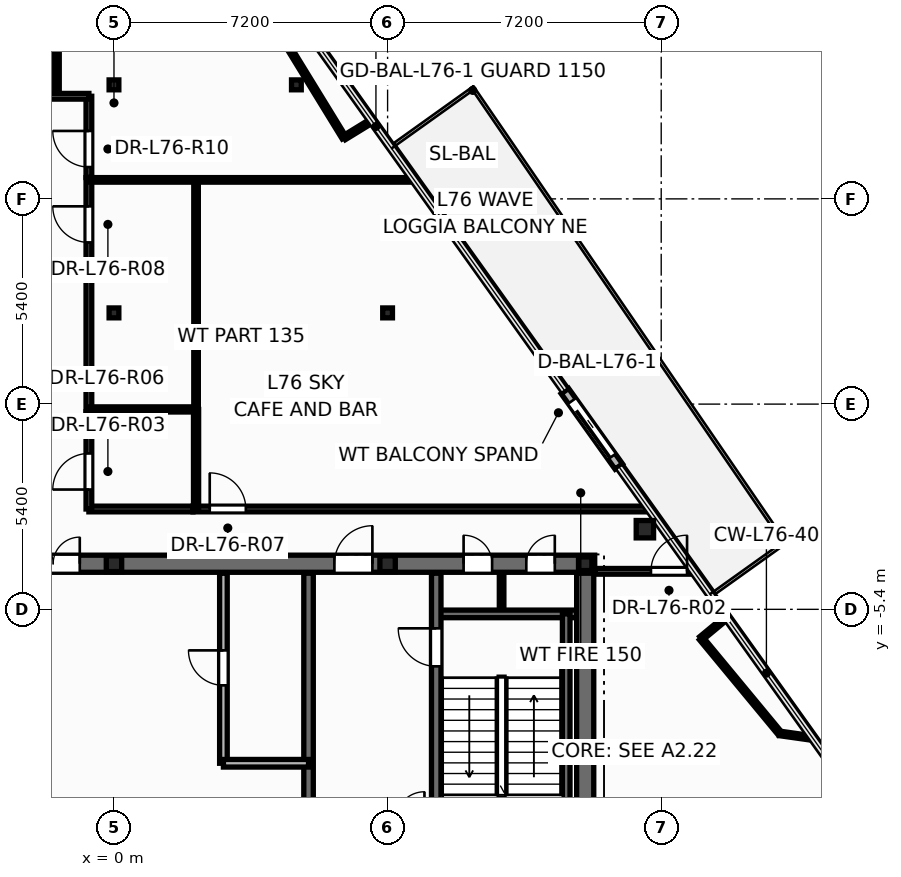
"""IFC4 building model, lengths in metres.
Left out: names, types, materials, properties, quantities, classifications, styles, units other than length and angle.
Written with IfcOpenShell. Run it as: python <this file> out.ifc"""

import sys

from ifc_helpers import new_model, si_unit, direction, frame, frame_2d, origin, origin_2d, place, context, subcontext, project, spatial, rectangle, hollow_circle, i_section, extrude, element, fill, save


model = new_model("IFC4")
c1 = context("Model", 3, precision=1e-05, world=origin(), true_north=direction((0.0, 1.0)))
c2 = subcontext(c1, "Body", "Model", "MODEL_VIEW")
j1 = project(units=[si_unit("LENGTHUNIT", "METRE"), si_unit("PLANEANGLEUNIT", "RADIAN")], contexts=[c1])
p1 = place(None, origin())
s1 = spatial("IfcSite", under=j1, at=p1, CompositionType="ELEMENT")
p2 = place(p1, origin())
s2 = spatial("IfcBuilding", under=s1, at=p2, CompositionType="ELEMENT")
p3 = place(p2, frame((0.0, 0.0, 289.2)))
s3 = spatial("IfcBuildingStorey", under=s2, at=p3, CompositionType="ELEMENT", Elevation=289.2)
for number, where, z_axis, x_axis in (
    (1, (13.97, -3.292, 0.0), (0.0, 0.0, 1.0), (1.0, 0.0, 0.0)),
    (2, (8.306, 4.638, 0.0), (0.0, 0.0, 1.0), (1.0, 0.0, 0.0)),
):
    element("IfcColumn", number, at=place(p3, frame(where, z_axis=z_axis, x_axis=x_axis)), inside=s3, PredefinedType="COLUMN", context=c2, shape_type="SweptSolid", body=[
        extrude(hollow_circle(Radius=0.229, WallThickness=0.016, at=origin_2d()), origin(), (0.0, 0.0, 1.0), 4.2),
    ])
p4 = place(p3, frame((12.4, -4.2, 0.0), z_axis=(0.0, 0.0, 1.0), x_axis=(1.0, 0.0, 0.0)))
e3 = element("IfcColumn", 3, at=p4, inside=s3, PredefinedType="COLUMN", context=c2, shape_type="SweptSolid", body=[
    extrude(i_section(OverallWidth=0.352, OverallDepth=0.359, WebThickness=0.018, FlangeThickness=0.026, at=origin_2d()), origin(), (0.0, 0.0, 1.0), 4.2),
])
for number, where, z_axis, x_axis in (
    (4, (0.0, -4.2, 0.0), (0.0, 0.0, 1.0), (1.0, 0.0, 0.0)),
    (5, (7.2, -4.2, 0.0), (0.0, 0.0, 1.0), (1.0, 0.0, 0.0)),
):
    element("IfcColumn", number, at=place(p3, frame(where, z_axis=z_axis, x_axis=x_axis)), inside=s3, PredefinedType="PILASTER", context=c2, shape_type="SweptSolid", body=[
        extrude(i_section(OverallWidth=0.405, OverallDepth=0.414, WebThickness=0.022, FlangeThickness=0.032, at=origin_2d()), origin(), (0.0, 0.0, 1.0), 4.2),
    ])
for number, where, z_axis, x_axis in (
    (6, (0.0, 2.4, 0.0), (0.0, 0.0, 1.0), (1.0, 0.0, 0.0)),
    (7, (7.2, 2.4, 0.0), (0.0, 0.0, 1.0), (1.0, 0.0, 0.0)),
    (8, (0.0, 8.4, 0.0), (0.0, 0.0, 1.0), (1.0, 0.0, 0.0)),
    (9, (4.8, 8.4, 0.0), (0.0, 0.0, 1.0), (1.0, 0.0, 0.0)),
):
    element("IfcColumn", number, at=place(p3, frame(where, z_axis=z_axis, x_axis=x_axis)), inside=s3, PredefinedType="COLUMN", context=c2, shape_type="SweptSolid", body=[
        extrude(i_section(OverallWidth=0.256, OverallDepth=0.26, WebThickness=0.01, FlangeThickness=0.017, at=origin_2d()), origin(), (0.0, 0.0, 1.0), 4.2),
    ])
p5 = place(p3, frame((13.284, -1.642, -0.015), z_axis=(0.0, 0.0, 1.0), x_axis=(-0.581266589652, 0.813713187649, 0.0)))
e10 = element("IfcWall", 10, at=p5, inside=s3, PredefinedType="STANDARD", context=c2, shape_type="SweptSolid", body=[
    extrude(rectangle(XDim=2.44, YDim=0.24, at=frame_2d((1.22, 0.0))), origin(), (0.0, 0.0, 1.0), 3.453),
])
p6 = place(p5, frame((0.32, 0.0, 0.015)))
e11 = element("IfcOpeningElement", 11, at=p6, cuts=e10, PredefinedType="OPENING", context=c2, shape_type="SweptSolid", body=[
    extrude(rectangle(XDim=1.806, YDim=2.204, at=frame_2d((0.9, 1.102))), frame((0.0, 0.13, 0.0), z_axis=(0.0, -1.0, 0.0), x_axis=(1.0, 0.0, 0.0)), (0.0, 0.0, 1.0), 0.26),
])
p7 = place(p3, frame((10.2, -5.52, 0.0), z_axis=(0.0, 0.0, 1.0), x_axis=(0.0, 1.0, 0.0)))
e12 = element("IfcWall", 12, at=p7, inside=s3, PredefinedType="PARTITIONING", context=c2, shape_type="SweptSolid", body=[
    extrude(rectangle(XDim=1.12, YDim=0.12, at=frame_2d((0.56, 0.0))), origin(), (0.0, 0.0, 1.0), 3.92),
])
p8 = place(p3, frame((-12.65, -4.2, 0.0), z_axis=(0.0, 0.0, 1.0), x_axis=(1.0, 0.0, 0.0)))
e13 = element("IfcWall", 13, at=p8, inside=s3, PredefinedType="SHEAR", context=c2, shape_type="SweptSolid", body=[
    extrude(rectangle(XDim=25.3, YDim=0.45, at=frame_2d((12.65, 0.0))), origin(), (0.0, 0.0, 1.0), 4.2),
])
p9 = place(p8, frame((1.85, 0.0, 0.0)))
e14 = element("IfcOpeningElement", 14, at=p9, cuts=e13, PredefinedType="OPENING", context=c2, shape_type="SweptSolid", body=[
    extrude(rectangle(XDim=0.756, YDim=2.054, at=frame_2d((0.375, 1.027))), frame((0.0, 0.235, 0.0), z_axis=(0.0, -1.0, 0.0), x_axis=(1.0, 0.0, 0.0)), (0.0, 0.0, 1.0), 0.47),
])
p10 = place(p8, frame((21.85, 0.0, 0.0)))
e15 = element("IfcOpeningElement", 15, at=p10, cuts=e13, PredefinedType="OPENING", context=c2, shape_type="SweptSolid", body=[
    extrude(rectangle(XDim=0.756, YDim=2.054, at=frame_2d((0.375, 1.027))), frame((0.0, 0.235, 0.0), z_axis=(0.0, -1.0, 0.0), x_axis=(1.0, 0.0, 0.0)), (0.0, 0.0, 1.0), 0.47),
])
p11 = place(p8, frame((23.5, 0.0, 0.0)))
e16 = element("IfcOpeningElement", 16, at=p11, cuts=e13, PredefinedType="OPENING", context=c2, shape_type="SweptSolid", body=[
    extrude(rectangle(XDim=0.756, YDim=2.054, at=frame_2d((0.375, 1.027))), frame((0.0, 0.235, 0.0), z_axis=(0.0, -1.0, 0.0), x_axis=(1.0, 0.0, 0.0)), (0.0, 0.0, 1.0), 0.47),
])
p12 = place(p8, frame((5.85, 0.0, 0.0)))
e17 = element("IfcOpeningElement", 17, at=p12, cuts=e13, PredefinedType="OPENING", context=c2, shape_type="SweptSolid", body=[
    extrude(rectangle(XDim=1.006, YDim=2.104, at=frame_2d((0.5, 1.052))), frame((0.0, 0.235, 0.0), z_axis=(0.0, -1.0, 0.0), x_axis=(1.0, 0.0, 0.0)), (0.0, 0.0, 1.0), 0.47),
])
p13 = place(p8, frame((10.35, 0.0, 0.0)))
e18 = element("IfcOpeningElement", 18, at=p13, cuts=e13, PredefinedType="OPENING", context=c2, shape_type="SweptSolid", body=[
    extrude(rectangle(XDim=1.406, YDim=2.154, at=frame_2d((0.7, 1.077))), frame((0.0, 0.235, 0.0), z_axis=(0.0, -1.0, 0.0), x_axis=(1.0, 0.0, 0.0)), (0.0, 0.0, 1.0), 0.47),
])
p14 = place(p8, frame((18.45, 0.0, 0.0)))
e19 = element("IfcOpeningElement", 19, at=p14, cuts=e13, PredefinedType="OPENING", context=c2, shape_type="SweptSolid", body=[
    extrude(rectangle(XDim=1.006, YDim=2.104, at=frame_2d((0.5, 1.052))), frame((0.0, 0.235, 0.0), z_axis=(0.0, -1.0, 0.0), x_axis=(1.0, 0.0, 0.0)), (0.0, 0.0, 1.0), 0.47),
])
p15 = place(p3, frame((8.48, -5.52, 0.0), z_axis=(0.0, 0.0, 1.0), x_axis=(1.0, 0.0, 0.0)))
e20 = element("IfcWall", 20, at=p15, inside=s3, PredefinedType="SOLIDWALL", context=c2, shape_type="SweptSolid", body=[
    extrude(rectangle(XDim=3.87, YDim=0.2, at=frame_2d((1.935, 0.0))), origin(), (0.0, 0.0, 1.0), 4.2),
])
p16 = place(p3, frame((11.9, -13.1, 0.0), z_axis=(0.0, 0.0, 1.0), x_axis=(0.0, 1.0, 0.0)))
e21 = element("IfcWall", 21, at=p16, inside=s3, PredefinedType="SOLIDWALL", context=c2, shape_type="SweptSolid", body=[
    extrude(rectangle(XDim=7.58, YDim=0.2, at=frame_2d((3.79, 0.0))), origin(), (0.0, 0.0, 1.0), 4.2),
])
p17 = place(p3, frame((8.48, -13.85, 0.0), z_axis=(0.0, 0.0, 1.0), x_axis=(0.0, 1.0, 0.0)))
e22 = element("IfcWall", 22, at=p17, inside=s3, PredefinedType="SHEAR", context=c2, shape_type="SweptSolid", body=[
    extrude(rectangle(XDim=9.4, YDim=0.25, at=frame_2d((4.7, 0.0))), origin(), (0.0, 0.0, 1.0), 4.2),
])
p18 = place(p17, frame((6.95, 0.0, 0.0)))
e23 = element("IfcOpeningElement", 23, at=p18, cuts=e22, PredefinedType="OPENING", context=c2, shape_type="SweptSolid", body=[
    extrude(rectangle(XDim=1.006, YDim=2.104, at=frame_2d((0.5, 1.052))), frame((0.0, 0.135, 0.0), z_axis=(0.0, -1.0, 0.0), x_axis=(1.0, 0.0, 0.0)), (0.0, 0.0, 1.0), 0.27),
])
p19 = place(p3, frame((5.12, -13.85, 0.0), z_axis=(0.0, 0.0, 1.0), x_axis=(0.0, 1.0, 0.0)))
e24 = element("IfcWall", 24, at=p19, inside=s3, PredefinedType="SHEAR", context=c2, shape_type="SweptSolid", body=[
    extrude(rectangle(XDim=9.4, YDim=0.25, at=frame_2d((4.7, 0.0))), origin(), (0.0, 0.0, 1.0), 4.2),
])
p20 = place(p3, frame((12.4, -13.85, 0.0), z_axis=(0.0, 0.0, 1.0), x_axis=(0.0, 1.0, 0.0)))
e25 = element("IfcWall", 25, at=p20, inside=s3, PredefinedType="SHEAR", context=c2, shape_type="SweptSolid", body=[
    extrude(rectangle(XDim=9.4, YDim=0.45, at=frame_2d((4.7, 0.0))), origin(), (0.0, 0.0, 1.0), 4.2),
])
p21 = place(p3, frame((2.88, -9.45, 0.0), z_axis=(0.0, 0.0, 1.0), x_axis=(0.0, 1.0, 0.0)))
e26 = element("IfcWall", 26, at=p21, inside=s3, PredefinedType="SOLIDWALL", context=c2, shape_type="SweptSolid", body=[
    extrude(rectangle(XDim=5.0, YDim=0.2, at=frame_2d((2.5, 0.0))), origin(), (0.0, 0.0, 1.0), 3.92),
])
p22 = place(p21, frame((2.05, 0.0, 0.0)))
e27 = element("IfcOpeningElement", 27, at=p22, cuts=e26, PredefinedType="OPENING", context=c2, shape_type="SweptSolid", body=[
    extrude(rectangle(XDim=0.926, YDim=2.104, at=frame_2d((0.46, 1.052))), frame((0.0, 0.11, 0.0), z_axis=(0.0, -1.0, 0.0), x_axis=(1.0, 0.0, 0.0)), (0.0, 0.0, 1.0), 0.22),
])
p23 = place(p3, frame((2.88, -9.45, 0.0), z_axis=(0.0, 0.0, 1.0), x_axis=(1.0, 0.0, 0.0)))
e28 = element("IfcWall", 28, at=p23, inside=s3, PredefinedType="SOLIDWALL", context=c2, shape_type="SweptSolid", body=[
    extrude(rectangle(XDim=2.24, YDim=0.2, at=frame_2d((1.12, 0.0))), origin(), (0.0, 0.0, 1.0), 3.92),
])
p24 = place(p3, frame((2.08, -2.76, 0.0), z_axis=(0.0, 0.0, 1.0), x_axis=(1.0, 0.0, 0.0)))
e29 = element("IfcWall", 29, at=p24, inside=s3, PredefinedType="PARTITIONING", context=c2, shape_type="SweptSolid", body=[
    extrude(rectangle(XDim=12.002, YDim=0.15, at=frame_2d((6.001, 0.0))), origin(), (0.0, 0.0, 1.0), 2.895),
])
p25 = place(p24, frame((0.44, 0.0, 0.0)))
e30 = element("IfcOpeningElement", 30, at=p25, cuts=e29, PredefinedType="OPENING", context=c2, shape_type="SweptSolid", body=[
    extrude(rectangle(XDim=0.956, YDim=2.104, at=frame_2d((0.475, 1.052))), frame((0.0, 0.085, 0.0), z_axis=(0.0, -1.0, 0.0), x_axis=(1.0, 0.0, 0.0)), (0.0, 0.0, 1.0), 0.17),
])
p26 = place(p3, frame((-1.5, 8.1, 0.0), z_axis=(0.0, 0.0, 1.0), x_axis=(0.0, 1.0, 0.0)))
e31 = element("IfcWall", 31, at=p26, inside=s3, PredefinedType="PARTITIONING", context=c2, shape_type="SweptSolid", body=[
    extrude(rectangle(XDim=6.189, YDim=0.12, at=frame_2d((3.095, 0.0))), origin(), (0.0, 0.0, 1.0), 2.895),
])
p27 = place(p3, frame((-0.66, -0.2, 0.0), z_axis=(0.0, 0.0, 1.0), x_axis=(0.0, 1.0, 0.0)))
e32 = element("IfcWall", 32, at=p27, inside=s3, PredefinedType="PARTITIONING", context=c2, shape_type="SweptSolid", body=[
    extrude(rectangle(XDim=6.16, YDim=0.15, at=frame_2d((3.08, 0.0))), origin(), (0.0, 0.0, 1.0), 2.895),
])
p28 = place(p27, frame((4.454, 0.0, 0.0)))
e33 = element("IfcOpeningElement", 33, at=p28, cuts=e32, PredefinedType="OPENING", context=c2, shape_type="SweptSolid", body=[
    extrude(rectangle(XDim=0.956, YDim=2.104, at=frame_2d((0.475, 1.052))), frame((0.0, 0.085, 0.0), z_axis=(0.0, -1.0, 0.0), x_axis=(1.0, 0.0, 0.0)), (0.0, 0.0, 1.0), 0.17),
])
p29 = place(p3, frame((2.16, -0.2, 0.0), z_axis=(0.0, 0.0, 1.0), x_axis=(0.0, 1.0, 0.0)))
e34 = element("IfcWall", 34, at=p29, inside=s3, PredefinedType="PARTITIONING", context=c2, shape_type="SweptSolid", body=[
    extrude(rectangle(XDim=6.1, YDim=0.12, at=frame_2d((3.05, 0.0))), origin(), (0.0, 0.0, 1.0), 2.895),
])
p30 = place(p3, frame((-0.66, 5.9, 0.0), z_axis=(0.0, 0.0, 1.0), x_axis=(1.0, 0.0, 0.0)))
e35 = element("IfcWall", 35, at=p30, inside=s3, PredefinedType="PARTITIONING", context=c2, shape_type="SweptSolid", body=[
    extrude(rectangle(XDim=8.556, YDim=0.12, at=frame_2d((4.278, 0.0))), origin(), (0.0, 0.0, 1.0), 2.895),
])
p31 = place(p3, frame((17.523, -8.666, 0.0), z_axis=(0.0, 0.0, 1.0), x_axis=(-0.63764463782, 0.770330653589, 0.0)))
e36 = element("IfcWall", 36, at=p31, inside=s3, PredefinedType="PARTITIONING", context=c2, shape_type="SweptSolid", body=[
    extrude(rectangle(XDim=3.248, YDim=0.12, at=frame_2d((1.624, 0.0))), origin(), (0.0, 0.0, 1.0), 3.92),
])
p32 = place(p3, frame((6.057, 7.009, 0.0), z_axis=(0.0, 0.0, 1.0), x_axis=(-0.523167839784, 0.852229670579, 0.0)))
e37 = element("IfcWall", 37, at=p32, inside=s3, PredefinedType="PARTITIONING", context=c2, shape_type="SweptSolid", body=[
    extrude(rectangle(XDim=3.137, YDim=0.12, at=frame_2d((1.568, 0.0))), origin(), (0.0, 0.0, 1.0), 2.895),
])
p33 = place(p3, frame((-0.66, -2.76, 0.0), z_axis=(0.0, 0.0, 1.0), x_axis=(1.0, 0.0, 0.0)))
e38 = element("IfcWall", 38, at=p33, inside=s3, PredefinedType="PARTITIONING", context=c2, shape_type="SweptSolid", body=[
    extrude(rectangle(XDim=2.738, YDim=0.15, at=frame_2d((1.369, 0.0))), origin(), (0.0, 0.0, 1.0), 2.895),
])
p34 = place(p3, frame((-0.66, -0.14, 0.0), z_axis=(0.0, 0.0, 1.0), x_axis=(1.0, 0.0, 0.0)))
e39 = element("IfcWall", 39, at=p34, inside=s3, PredefinedType="PARTITIONING", context=c2, shape_type="SweptSolid", body=[
    extrude(rectangle(XDim=2.82, YDim=0.135, at=frame_2d((1.41, 0.0))), origin(), (0.0, 0.0, 1.0), 2.895),
])
p35 = place(p3, frame((12.652, -4.4, 0.0), z_axis=(0.0, 0.0, 1.0), x_axis=(1.0, 0.0, 0.0)))
e40 = element("IfcWall", 40, at=p35, inside=s3, PredefinedType="PARTITIONING", context=c2, shape_type="SweptSolid", body=[
    extrude(rectangle(XDim=2.602, YDim=0.15, at=frame_2d((1.301, 0.0))), origin(), (0.0, 0.0, 1.0), 2.895),
])
p36 = place(p35, frame((1.478, 0.0, 0.0)))
e41 = element("IfcOpeningElement", 41, at=p36, cuts=e40, PredefinedType="OPENING", context=c2, shape_type="SweptSolid", body=[
    extrude(rectangle(XDim=0.956, YDim=2.104, at=frame_2d((0.475, 1.052))), frame((0.0, 0.085, 0.0), z_axis=(0.0, -1.0, 0.0), x_axis=(1.0, 0.0, 0.0)), (0.0, 0.0, 1.0), 0.17),
])
p37 = place(p3, frame((-0.66, -2.76, 0.0), z_axis=(0.0, 0.0, 1.0), x_axis=(0.0, 1.0, 0.0)))
e42 = element("IfcWall", 42, at=p37, inside=s3, PredefinedType="PARTITIONING", context=c2, shape_type="SweptSolid", body=[
    extrude(rectangle(XDim=2.558, YDim=0.15, at=frame_2d((1.279, 0.0))), origin(), (0.0, 0.0, 1.0), 3.92),
])
p38 = place(p37, frame((0.512, 0.0, 0.0)))
e43 = element("IfcOpeningElement", 43, at=p38, cuts=e42, PredefinedType="OPENING", context=c2, shape_type="SweptSolid", body=[
    extrude(rectangle(XDim=0.956, YDim=2.104, at=frame_2d((0.475, 1.052))), frame((0.0, 0.085, 0.0), z_axis=(0.0, -1.0, 0.0), x_axis=(1.0, 0.0, 0.0)), (0.0, 0.0, 1.0), 0.17),
])
p39 = place(p3, frame((2.16, -2.76, 0.0), z_axis=(0.0, 0.0, 1.0), x_axis=(0.0, 1.0, 0.0)))
e44 = element("IfcWall", 44, at=p39, inside=s3, PredefinedType="PARTITIONING", context=c2, shape_type="SweptSolid", body=[
    extrude(rectangle(XDim=2.62, YDim=0.135, at=frame_2d((1.31, 0.0))), origin(), (0.0, 0.0, 1.0), 3.92),
])
p40 = place(p3, frame((-0.66, 5.962, 0.0), z_axis=(0.0, 0.0, 1.0), x_axis=(0.0, 1.0, 0.0)))
e45 = element("IfcWall", 45, at=p40, inside=s3, PredefinedType="PARTITIONING", context=c2, shape_type="SweptSolid", body=[
    extrude(rectangle(XDim=2.138, YDim=0.15, at=frame_2d((1.069, 0.0))), origin(), (0.0, 0.0, 1.0), 3.92),
])
p41 = place(p40, frame((0.275, 0.0, 0.0)))
e46 = element("IfcOpeningElement", 46, at=p41, cuts=e45, PredefinedType="OPENING", context=c2, shape_type="SweptSolid", body=[
    extrude(rectangle(XDim=0.956, YDim=2.104, at=frame_2d((0.475, 1.052))), frame((0.0, 0.085, 0.0), z_axis=(0.0, -1.0, 0.0), x_axis=(1.0, 0.0, 0.0)), (0.0, 0.0, 1.0), 0.17),
])
p42 = place(p3, frame((-2.36, 8.1, 0.0), z_axis=(0.0, 0.0, 1.0), x_axis=(1.0, 0.0, 0.0)))
e47 = element("IfcWall", 47, at=p42, inside=s3, PredefinedType="PARTITIONING", context=c2, shape_type="SweptSolid", body=[
    extrude(rectangle(XDim=1.7, YDim=0.15, at=frame_2d((0.85, 0.0))), origin(), (0.0, 0.0, 1.0), 2.895),
])
p43 = place(p3, frame((18.375, -8.786, 0.0), z_axis=(0.0, 0.0, 1.0), x_axis=(-0.990225952564, 0.139472444839, 0.0)))
e48 = element("IfcWall", 48, at=p43, inside=s3, PredefinedType="PARTITIONING", context=c2, shape_type="SweptSolid", body=[
    extrude(rectangle(XDim=0.859, YDim=0.12, at=frame_2d((0.43, 0.0))), origin(), (0.0, 0.0, 1.0), 3.438),
])
p44 = place(p3, frame((15.453, -6.164, 0.0), z_axis=(0.0, 0.0, 1.0), x_axis=(0.770181697766, 0.637824546742, 0.0)))
e49 = element("IfcWall", 49, at=p44, inside=s3, PredefinedType="PARTITIONING", context=c2, shape_type="SweptSolid", body=[
    extrude(rectangle(XDim=0.856, YDim=0.12, at=frame_2d((0.428, 0.0))), origin(), (0.0, 0.0, 1.0), 3.438),
])
p45 = place(p3, frame((6.777, 7.451, 0.0), z_axis=(0.0, 0.0, 1.0), x_axis=(-0.852193839214, -0.52322620386, 0.0)))
e50 = element("IfcWall", 50, at=p45, inside=s3, PredefinedType="PARTITIONING", context=c2, shape_type="SweptSolid", body=[
    extrude(rectangle(XDim=0.844, YDim=0.12, at=frame_2d((0.422, 0.0))), origin(), (0.0, 0.0, 1.0), 2.895),
])
p46 = place(p6, origin())
e51 = element("IfcDoor", 51, at=p46, inside=s3, OperationType="SLIDING_TO_LEFT", PredefinedType="DOOR", context=c2, shape_type="SweptSolid", body=[
    extrude(rectangle(XDim=1.8, YDim=2.2, at=frame_2d((0.9, 1.1))), frame((0.0, 0.025, 0.0), z_axis=(0.0, -1.0, 0.0), x_axis=(1.0, 0.0, 0.0)), (0.0, 0.0, 1.0), 0.05),
])
fill(e11, e51)
p47 = place(p22, origin())
e52 = element("IfcDoor", 52, at=p47, inside=s3, OperationType="SINGLE_SWING_RIGHT", PredefinedType="DOOR", context=c2, shape_type="SweptSolid", body=[
    extrude(rectangle(XDim=0.92, YDim=2.1, at=frame_2d((0.46, 1.05))), frame((0.0, 0.025, 0.0), z_axis=(0.0, -1.0, 0.0), x_axis=(1.0, 0.0, 0.0)), (0.0, 0.0, 1.0), 0.05),
])
fill(e27, e52)
p48 = place(p18, origin())
e53 = element("IfcDoor", 53, at=p48, inside=s3, OperationType="SINGLE_SWING_RIGHT", PredefinedType="DOOR", context=c2, shape_type="SweptSolid", body=[
    extrude(rectangle(XDim=1.0, YDim=2.1, at=frame_2d((0.5, 1.05))), frame((0.0, 0.025, 0.0), z_axis=(0.0, -1.0, 0.0), x_axis=(1.0, 0.0, 0.0)), (0.0, 0.0, 1.0), 0.05),
])
fill(e23, e53)
p49 = place(p10, origin())
e54 = element("IfcDoor", 54, at=p49, inside=s3, OperationType="SINGLE_SWING_LEFT", PredefinedType="DOOR", context=c2, shape_type="SweptSolid", body=[
    extrude(rectangle(XDim=0.75, YDim=2.05, at=frame_2d((0.375, 1.025))), frame((0.0, 0.025, 0.0), z_axis=(0.0, -1.0, 0.0), x_axis=(1.0, 0.0, 0.0)), (0.0, 0.0, 1.0), 0.05),
])
fill(e15, e54)
p50 = place(p11, origin())
e55 = element("IfcDoor", 55, at=p50, inside=s3, OperationType="SINGLE_SWING_RIGHT", PredefinedType="DOOR", context=c2, shape_type="SweptSolid", body=[
    extrude(rectangle(XDim=0.75, YDim=2.05, at=frame_2d((0.375, 1.025))), frame((0.0, 0.025, 0.0), z_axis=(0.0, -1.0, 0.0), x_axis=(1.0, 0.0, 0.0)), (0.0, 0.0, 1.0), 0.05),
])
fill(e16, e55)
p51 = place(p13, origin())
e56 = element("IfcDoor", 56, at=p51, inside=s3, OperationType="DOUBLE_DOOR_SINGLE_SWING", PredefinedType="DOOR", context=c2, shape_type="SweptSolid", body=[
    extrude(rectangle(XDim=1.4, YDim=2.15, at=frame_2d((0.7, 1.075))), frame((0.0, 0.025, 0.0), z_axis=(0.0, -1.0, 0.0), x_axis=(1.0, 0.0, 0.0)), (0.0, 0.0, 1.0), 0.05),
])
fill(e18, e56)
p52 = place(p14, origin())
e57 = element("IfcDoor", 57, at=p52, inside=s3, OperationType="SINGLE_SWING_RIGHT", PredefinedType="DOOR", context=c2, shape_type="SweptSolid", body=[
    extrude(rectangle(XDim=1.0, YDim=2.1, at=frame_2d((0.5, 1.05))), frame((0.0, 0.025, 0.0), z_axis=(0.0, -1.0, 0.0), x_axis=(1.0, 0.0, 0.0)), (0.0, 0.0, 1.0), 0.05),
])
fill(e19, e57)
p53 = place(p36, origin())
e58 = element("IfcDoor", 58, at=p53, inside=s3, OperationType="SINGLE_SWING_RIGHT", PredefinedType="DOOR", context=c2, shape_type="SweptSolid", body=[
    extrude(rectangle(XDim=0.95, YDim=2.1, at=frame_2d((0.475, 1.05))), frame((0.0, 0.025, 0.0), z_axis=(0.0, -1.0, 0.0), x_axis=(1.0, 0.0, 0.0)), (0.0, 0.0, 1.0), 0.05),
])
fill(e41, e58)
p54 = place(p38, origin())
e59 = element("IfcDoor", 59, at=p54, inside=s3, OperationType="SINGLE_SWING_LEFT", PredefinedType="DOOR", context=c2, shape_type="SweptSolid", body=[
    extrude(rectangle(XDim=0.95, YDim=2.1, at=frame_2d((0.475, 1.05))), frame((0.0, 0.025, 0.0), z_axis=(0.0, -1.0, 0.0), x_axis=(1.0, 0.0, 0.0)), (0.0, 0.0, 1.0), 0.05),
])
fill(e43, e59)
p55 = place(p25, origin())
e60 = element("IfcDoor", 60, at=p55, inside=s3, OperationType="SINGLE_SWING_LEFT", PredefinedType="DOOR", context=c2, shape_type="SweptSolid", body=[
    extrude(rectangle(XDim=0.95, YDim=2.1, at=frame_2d((0.475, 1.05))), frame((0.0, 0.025, 0.0), z_axis=(0.0, -1.0, 0.0), x_axis=(1.0, 0.0, 0.0)), (0.0, 0.0, 1.0), 0.05),
])
fill(e30, e60)
p56 = place(p28, origin())
e61 = element("IfcDoor", 61, at=p56, inside=s3, OperationType="SINGLE_SWING_RIGHT", PredefinedType="DOOR", context=c2, shape_type="SweptSolid", body=[
    extrude(rectangle(XDim=0.95, YDim=2.1, at=frame_2d((0.475, 1.05))), frame((0.0, 0.025, 0.0), z_axis=(0.0, -1.0, 0.0), x_axis=(1.0, 0.0, 0.0)), (0.0, 0.0, 1.0), 0.05),
])
fill(e33, e61)
p57 = place(p41, origin())
e62 = element("IfcDoor", 62, at=p57, inside=s3, OperationType="SINGLE_SWING_RIGHT", PredefinedType="DOOR", context=c2, shape_type="SweptSolid", body=[
    extrude(rectangle(XDim=0.95, YDim=2.1, at=frame_2d((0.475, 1.05))), frame((0.0, 0.025, 0.0), z_axis=(0.0, -1.0, 0.0), x_axis=(1.0, 0.0, 0.0)), (0.0, 0.0, 1.0), 0.05),
])
fill(e46, e62)
save(model, sys.argv[1])
